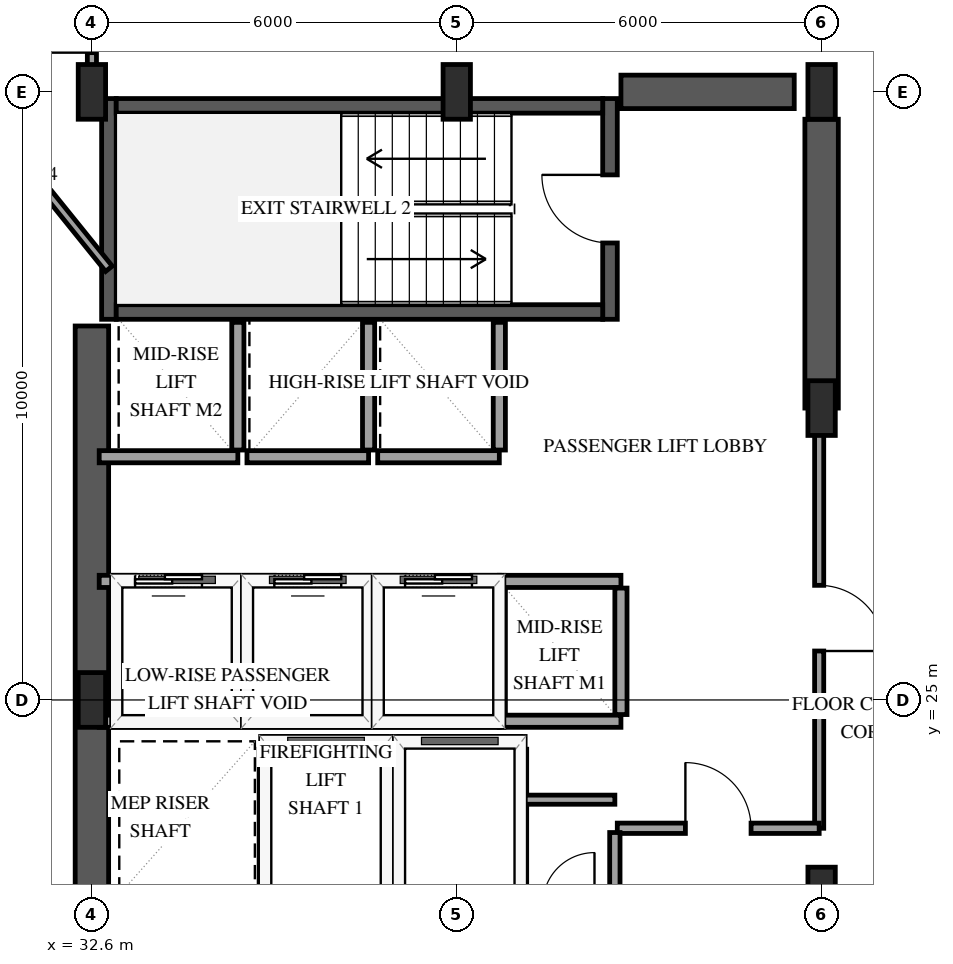
"""IFC4 building model, lengths in metres.
Left out: names, types, materials, properties, quantities, classifications, styles, units other than length and angle.
Written with IfcOpenShell. Run it as: python <this file> out.ifc"""

import sys

from ifc_helpers import new_model, si_unit, direction, frame, frame_2d, origin, origin_2d, place, context, subcontext, project, spatial, rectangle, extrude, element, fill, save


model = new_model("IFC4")
c1 = context("Model", 3, precision=1e-05, world=origin(), true_north=direction((0.0, 1.0)))
c2 = subcontext(c1, "Body", "Model", "MODEL_VIEW")
j1 = project(units=[si_unit("LENGTHUNIT", "METRE"), si_unit("PLANEANGLEUNIT", "RADIAN")], contexts=[c1])
p1 = place(None, origin())
s1 = spatial("IfcSite", under=j1, at=p1, CompositionType="ELEMENT")
p2 = place(p1, origin())
s2 = spatial("IfcBuilding", under=s1, at=p2, CompositionType="ELEMENT")
p3 = place(p2, frame((0.0, 0.0, 122.5)))
s3 = spatial("IfcBuildingStorey", under=s2, at=p3, CompositionType="ELEMENT", Elevation=122.5)
p4 = place(p3, frame((32.88, 31.26, 0.0), z_axis=(0.0, 0.0, 1.0), x_axis=(0.0, 1.0, 0.0)))
e1 = element("IfcWall", 1, at=p4, inside=s3, PredefinedType="SHEAR", context=c2, shape_type="SweptSolid", body=[
    extrude(rectangle(XDim=3.63, YDim=0.24, at=frame_2d((1.815, 0.0))), origin(), (0.0, 0.0, 1.0), 3.9),
])
p5 = place(p3, frame((41.12, 31.26, 0.0), z_axis=(0.0, 0.0, 1.0), x_axis=(0.0, 1.0, 0.0)))
e2 = element("IfcWall", 2, at=p5, inside=s3, PredefinedType="SHEAR", context=c2, shape_type="SweptSolid", body=[
    extrude(rectangle(XDim=3.63, YDim=0.24, at=frame_2d((1.815, 0.0))), origin(), (0.0, 0.0, 1.0), 3.9),
])
p6 = place(p5, frame((1.255, 0.0, 0.0)))
e3 = element("IfcOpeningElement", 3, at=p6, cuts=e2, PredefinedType="OPENING", context=c2, shape_type="SweptSolid", body=[
    extrude(rectangle(XDim=1.12, YDim=2.15, at=frame_2d((0.56, 1.075))), frame((0.0, 0.13, 0.0), z_axis=(0.0, -1.0, 0.0), x_axis=(1.0, 0.0, 0.0)), (0.0, 0.0, 1.0), 0.26),
])
for number, where, z_axis, x_axis in (
    (4, (33.0, 31.38, 0.0), (0.0, 0.0, 1.0), (1.0, 0.0, 0.0)),
    (5, (33.0, 34.77, 0.0), (0.0, 0.0, 1.0), (1.0, 0.0, 0.0)),
):
    element("IfcWall", number, at=place(p3, frame(where, z_axis=z_axis, x_axis=x_axis)), inside=s3, PredefinedType="SHEAR", context=c2, shape_type="SweptSolid", body=[
        extrude(rectangle(XDim=8.0, YDim=0.24, at=frame_2d((4.0, 0.0))), origin(), (0.0, 0.0, 1.0), 3.9),
    ])
p7 = place(p3, frame((32.6, 18.85, 0.0), z_axis=(0.0, 0.0, 1.0), x_axis=(0.0, 1.0, 0.0)))
e6 = element("IfcWall", 6, at=p7, inside=s3, PredefinedType="SHEAR", context=c2, shape_type="SweptSolid", body=[
    extrude(rectangle(XDim=12.3, YDim=0.55, at=frame_2d((6.15, 0.0))), origin(), (0.0, 0.0, 1.0), 3.9),
])
p8 = place(p3, frame((41.3, 35.0, 0.0), z_axis=(0.0, 0.0, 1.0), x_axis=(1.0, 0.0, 0.0)))
e7 = element("IfcWall", 7, at=p8, inside=s3, PredefinedType="SHEAR", context=c2, shape_type="SweptSolid", body=[
    extrude(rectangle(XDim=2.85, YDim=0.55, at=frame_2d((1.425, 0.0))), origin(), (0.0, 0.0, 1.0), 3.9),
])
p9 = place(p3, frame((44.6, 29.8, 0.0), z_axis=(0.0, 0.0, 1.0), x_axis=(0.0, 1.0, 0.0)))
e8 = element("IfcWall", 8, at=p9, inside=s3, PredefinedType="SHEAR", context=c2, shape_type="SweptSolid", body=[
    extrude(rectangle(XDim=4.75, YDim=0.55, at=frame_2d((2.375, 0.0))), origin(), (0.0, 0.0, 1.0), 3.9),
])
for number, where, z_axis, x_axis in (
    (9, (32.6, 25.0, 0.0), (0.0, 0.0, 1.0), (1.0, 0.0, 0.0)),
    (10, (32.6, 35.0, 0.0), (0.0, 0.0, 1.0), (1.0, 0.0, 0.0)),
    (11, (38.6, 35.0, 0.0), (0.0, 0.0, 1.0), (1.0, 0.0, 0.0)),
    (12, (44.6, 21.8, 0.0), (0.0, 0.0, 1.0), (1.0, 0.0, 0.0)),
    (13, (44.6, 29.8, 0.0), (0.0, 0.0, 1.0), (1.0, 0.0, 0.0)),
    (14, (44.6, 35.0, 0.0), (0.0, 0.0, 1.0), (1.0, 0.0, 0.0)),
):
    element("IfcColumn", number, at=place(p3, frame(where, z_axis=z_axis, x_axis=x_axis)), inside=s3, PredefinedType="PILASTER", context=c2, shape_type="SweptSolid", body=[
        extrude(rectangle(XDim=0.45, YDim=0.9, at=origin_2d()), origin(), (0.0, 0.0, 1.0), 3.9),
    ])
p10 = place(p3, frame((35.45, 24.3, 0.0), z_axis=(0.0, 0.0, 1.0), x_axis=(1.0, 0.0, 0.0)))
e15 = element("IfcWall", 15, at=p10, inside=s3, PredefinedType="SOLIDWALL", context=c2, shape_type="SweptSolid", body=[
    extrude(rectangle(XDim=2.0, YDim=0.2, at=frame_2d((1.0, 0.0))), origin(), (0.0, 0.0, 1.0), 3.6),
])
for number, where, z_axis, x_axis in (
    (16, (35.45, 21.81, 0.0), (0.0, 0.0, 1.0), (0.0, 1.0, 0.0)),
    (17, (37.45, 21.81, 0.0), (0.0, 0.0, 1.0), (0.0, 1.0, 0.0)),
):
    element("IfcWall", number, at=place(p3, frame(where, z_axis=z_axis, x_axis=x_axis)), inside=s3, PredefinedType="SOLIDWALL", context=c2, shape_type="SweptSolid", body=[
        extrude(rectangle(XDim=2.38, YDim=0.2, at=frame_2d((1.19, 0.0))), origin(), (0.0, 0.0, 1.0), 3.6),
    ])
p11 = place(p3, frame((37.65, 24.3, 0.0), z_axis=(0.0, 0.0, 1.0), x_axis=(1.0, 0.0, 0.0)))
e18 = element("IfcWall", 18, at=p11, inside=s3, PredefinedType="SOLIDWALL", context=c2, shape_type="SweptSolid", body=[
    extrude(rectangle(XDim=2.0, YDim=0.2, at=frame_2d((1.0, 0.0))), origin(), (0.0, 0.0, 1.0), 3.6),
])
p12 = place(p3, frame((39.65, 21.81, 0.0), z_axis=(0.0, 0.0, 1.0), x_axis=(0.0, 1.0, 0.0)))
e19 = element("IfcWall", 19, at=p12, inside=s3, PredefinedType="SOLIDWALL", context=c2, shape_type="SweptSolid", body=[
    extrude(rectangle(XDim=2.38, YDim=0.2, at=frame_2d((1.19, 0.0))), origin(), (0.0, 0.0, 1.0), 3.6),
])
p13 = place(p3, frame((32.72, 24.65, 0.0), z_axis=(0.0, 0.0, 1.0), x_axis=(1.0, 0.0, 0.0)))
e20 = element("IfcWall", 20, at=p13, inside=s3, PredefinedType="SOLIDWALL", context=c2, shape_type="SweptSolid", body=[
    extrude(rectangle(XDim=2.28, YDim=0.2, at=frame_2d((1.14, 0.0))), origin(), (0.0, 0.0, 1.0), 3.6),
])
p14 = place(p3, frame((32.72, 26.95, 0.0), z_axis=(0.0, 0.0, 1.0), x_axis=(1.0, 0.0, 0.0)))
e21 = element("IfcWall", 21, at=p14, inside=s3, PredefinedType="SOLIDWALL", context=c2, shape_type="SweptSolid", body=[
    extrude(rectangle(XDim=2.28, YDim=0.2, at=frame_2d((1.14, 0.0))), origin(), (0.0, 0.0, 1.0), 3.6),
])
p15 = place(p14, frame((0.59, 0.0, 0.0)))
e22 = element("IfcOpeningElement", 22, at=p15, cuts=e21, PredefinedType="OPENING", context=c2, shape_type="SweptSolid", body=[
    extrude(rectangle(XDim=1.1, YDim=2.15, at=frame_2d((0.55, 1.075))), frame((0.0, 0.11, 0.0), z_axis=(0.0, -1.0, 0.0), x_axis=(1.0, 0.0, 0.0)), (0.0, 0.0, 1.0), 0.22),
])
p16 = place(p3, frame((35.0, 24.76, 0.0), z_axis=(0.0, 0.0, 1.0), x_axis=(0.0, 1.0, 0.0)))
e23 = element("IfcWall", 23, at=p16, inside=s3, PredefinedType="SOLIDWALL", context=c2, shape_type="SweptSolid", body=[
    extrude(rectangle(XDim=2.08, YDim=0.2, at=frame_2d((1.04, 0.0))), origin(), (0.0, 0.0, 1.0), 3.6),
])
p17 = place(p3, frame((35.15, 24.65, 0.0), z_axis=(0.0, 0.0, 1.0), x_axis=(1.0, 0.0, 0.0)))
e24 = element("IfcWall", 24, at=p17, inside=s3, PredefinedType="SOLIDWALL", context=c2, shape_type="SweptSolid", body=[
    extrude(rectangle(XDim=2.0, YDim=0.2, at=frame_2d((1.0, 0.0))), origin(), (0.0, 0.0, 1.0), 3.6),
])
p18 = place(p3, frame((35.15, 26.95, 0.0), z_axis=(0.0, 0.0, 1.0), x_axis=(1.0, 0.0, 0.0)))
e25 = element("IfcWall", 25, at=p18, inside=s3, PredefinedType="SOLIDWALL", context=c2, shape_type="SweptSolid", body=[
    extrude(rectangle(XDim=2.0, YDim=0.2, at=frame_2d((1.0, 0.0))), origin(), (0.0, 0.0, 1.0), 3.6),
])
p19 = place(p18, frame((0.45, 0.0, 0.0)))
e26 = element("IfcOpeningElement", 26, at=p19, cuts=e25, PredefinedType="OPENING", context=c2, shape_type="SweptSolid", body=[
    extrude(rectangle(XDim=1.1, YDim=2.15, at=frame_2d((0.55, 1.075))), frame((0.0, 0.11, 0.0), z_axis=(0.0, -1.0, 0.0), x_axis=(1.0, 0.0, 0.0)), (0.0, 0.0, 1.0), 0.22),
])
p20 = place(p3, frame((37.15, 24.76, 0.0), z_axis=(0.0, 0.0, 1.0), x_axis=(0.0, 1.0, 0.0)))
e27 = element("IfcWall", 27, at=p20, inside=s3, PredefinedType="SOLIDWALL", context=c2, shape_type="SweptSolid", body=[
    extrude(rectangle(XDim=2.08, YDim=0.2, at=frame_2d((1.04, 0.0))), origin(), (0.0, 0.0, 1.0), 3.6),
])
p21 = place(p3, frame((37.3, 24.65, 0.0), z_axis=(0.0, 0.0, 1.0), x_axis=(1.0, 0.0, 0.0)))
e28 = element("IfcWall", 28, at=p21, inside=s3, PredefinedType="SOLIDWALL", context=c2, shape_type="SweptSolid", body=[
    extrude(rectangle(XDim=2.0, YDim=0.2, at=frame_2d((1.0, 0.0))), origin(), (0.0, 0.0, 1.0), 3.6),
])
p22 = place(p3, frame((37.3, 26.95, 0.0), z_axis=(0.0, 0.0, 1.0), x_axis=(1.0, 0.0, 0.0)))
e29 = element("IfcWall", 29, at=p22, inside=s3, PredefinedType="SOLIDWALL", context=c2, shape_type="SweptSolid", body=[
    extrude(rectangle(XDim=2.0, YDim=0.2, at=frame_2d((1.0, 0.0))), origin(), (0.0, 0.0, 1.0), 3.6),
])
p23 = place(p22, frame((0.45, 0.0, 0.0)))
e30 = element("IfcOpeningElement", 30, at=p23, cuts=e29, PredefinedType="OPENING", context=c2, shape_type="SweptSolid", body=[
    extrude(rectangle(XDim=1.1, YDim=2.15, at=frame_2d((0.55, 1.075))), frame((0.0, 0.11, 0.0), z_axis=(0.0, -1.0, 0.0), x_axis=(1.0, 0.0, 0.0)), (0.0, 0.0, 1.0), 0.22),
])
p24 = place(p3, frame((39.3, 24.76, 0.0), z_axis=(0.0, 0.0, 1.0), x_axis=(0.0, 1.0, 0.0)))
e31 = element("IfcWall", 31, at=p24, inside=s3, PredefinedType="SOLIDWALL", context=c2, shape_type="SweptSolid", body=[
    extrude(rectangle(XDim=2.08, YDim=0.2, at=frame_2d((1.04, 0.0))), origin(), (0.0, 0.0, 1.0), 3.6),
])
for number, where, z_axis, x_axis in (
    (32, (39.3, 24.65, 0.0), (0.0, 0.0, 1.0), (1.0, 0.0, 0.0)),
    (33, (39.3, 26.95, 0.0), (0.0, 0.0, 1.0), (1.0, 0.0, 0.0)),
):
    element("IfcWall", number, at=place(p3, frame(where, z_axis=z_axis, x_axis=x_axis)), inside=s3, PredefinedType="SOLIDWALL", context=c2, shape_type="SweptSolid", body=[
        extrude(rectangle(XDim=2.0, YDim=0.2, at=frame_2d((1.0, 0.0))), origin(), (0.0, 0.0, 1.0), 3.6),
    ])
p25 = place(p3, frame((41.3, 24.76, 0.0), z_axis=(0.0, 0.0, 1.0), x_axis=(0.0, 1.0, 0.0)))
e34 = element("IfcWall", 34, at=p25, inside=s3, PredefinedType="SOLIDWALL", context=c2, shape_type="SweptSolid", body=[
    extrude(rectangle(XDim=2.08, YDim=0.2, at=frame_2d((1.04, 0.0))), origin(), (0.0, 0.0, 1.0), 3.6),
])
p26 = place(p3, frame((32.72, 29.0, 0.0), z_axis=(0.0, 0.0, 1.0), x_axis=(1.0, 0.0, 0.0)))
e35 = element("IfcWall", 35, at=p26, inside=s3, PredefinedType="SOLIDWALL", context=c2, shape_type="SweptSolid", body=[
    extrude(rectangle(XDim=2.28, YDim=0.2, at=frame_2d((1.14, 0.0))), origin(), (0.0, 0.0, 1.0), 3.6),
])
p27 = place(p3, frame((35.0, 29.11, 0.0), z_axis=(0.0, 0.0, 1.0), x_axis=(0.0, 1.0, 0.0)))
e36 = element("IfcWall", 36, at=p27, inside=s3, PredefinedType="SOLIDWALL", context=c2, shape_type="SweptSolid", body=[
    extrude(rectangle(XDim=2.1, YDim=0.2, at=frame_2d((1.05, 0.0))), origin(), (0.0, 0.0, 1.0), 3.6),
])
p28 = place(p3, frame((35.15, 29.0, 0.0), z_axis=(0.0, 0.0, 1.0), x_axis=(1.0, 0.0, 0.0)))
e37 = element("IfcWall", 37, at=p28, inside=s3, PredefinedType="SOLIDWALL", context=c2, shape_type="SweptSolid", body=[
    extrude(rectangle(XDim=2.0, YDim=0.2, at=frame_2d((1.0, 0.0))), origin(), (0.0, 0.0, 1.0), 3.6),
])
p29 = place(p3, frame((37.15, 29.11, 0.0), z_axis=(0.0, 0.0, 1.0), x_axis=(0.0, 1.0, 0.0)))
e38 = element("IfcWall", 38, at=p29, inside=s3, PredefinedType="SOLIDWALL", context=c2, shape_type="SweptSolid", body=[
    extrude(rectangle(XDim=2.1, YDim=0.2, at=frame_2d((1.05, 0.0))), origin(), (0.0, 0.0, 1.0), 3.6),
])
p30 = place(p3, frame((37.3, 29.0, 0.0), z_axis=(0.0, 0.0, 1.0), x_axis=(1.0, 0.0, 0.0)))
e39 = element("IfcWall", 39, at=p30, inside=s3, PredefinedType="SOLIDWALL", context=c2, shape_type="SweptSolid", body=[
    extrude(rectangle(XDim=2.0, YDim=0.2, at=frame_2d((1.0, 0.0))), origin(), (0.0, 0.0, 1.0), 3.6),
])
p31 = place(p3, frame((39.3, 29.11, 0.0), z_axis=(0.0, 0.0, 1.0), x_axis=(0.0, 1.0, 0.0)))
e40 = element("IfcWall", 40, at=p31, inside=s3, PredefinedType="SOLIDWALL", context=c2, shape_type="SweptSolid", body=[
    extrude(rectangle(XDim=2.1, YDim=0.2, at=frame_2d((1.05, 0.0))), origin(), (0.0, 0.0, 1.0), 3.6),
])
p32 = place(p3, frame((44.56, 29.8, 0.0), z_axis=(0.0, 0.0, 1.0), x_axis=(0.0, -1.0, 0.0)))
e41 = element("IfcWall", 41, at=p32, inside=s3, PredefinedType="PARTITIONING", context=c2, shape_type="SweptSolid", body=[
    extrude(rectangle(XDim=6.91, YDim=0.15, at=frame_2d((3.455, 0.0))), origin(), (0.0, 0.0, 1.0), 2.64),
])
p33 = place(p32, frame((2.915, 0.0, 0.0)))
e42 = element("IfcOpeningElement", 42, at=p33, cuts=e41, PredefinedType="OPENING", context=c2, shape_type="SweptSolid", body=[
    extrude(rectangle(XDim=1.08, YDim=2.15, at=frame_2d((0.54, 1.075))), frame((0.0, 0.085, 0.0), z_axis=(0.0, -1.0, 0.0), x_axis=(1.0, 0.0, 0.0)), (0.0, 0.0, 1.0), 0.17),
])
p34 = place(p3, frame((32.88, 32.091, 0.0), z_axis=(0.0, 0.0, 1.0), x_axis=(-0.627800500923, 0.778374287243, 0.0)))
e43 = element("IfcWall", 43, at=p34, inside=s3, PredefinedType="PARTITIONING", context=c2, shape_type="SweptSolid", body=[
    extrude(rectangle(XDim=3.972, YDim=0.14, at=frame_2d((1.986, 0.0))), origin(), (0.0, 0.0, 1.0), 3.6),
])
p35 = place(p3, frame((41.24, 22.89, 0.0), z_axis=(0.0, 0.0, 1.0), x_axis=(1.0, 0.0, 0.0)))
e44 = element("IfcWall", 44, at=p35, inside=s3, PredefinedType="PARTITIONING", context=c2, shape_type="SweptSolid", body=[
    extrude(rectangle(XDim=3.32, YDim=0.17, at=frame_2d((1.66, 0.0))), origin(), (0.0, 0.0, 1.0), 3.6),
])
p36 = place(p35, frame((1.12, 0.0, 0.0)))
e45 = element("IfcOpeningElement", 45, at=p36, cuts=e44, PredefinedType="OPENING", context=c2, shape_type="SweptSolid", body=[
    extrude(rectangle(XDim=1.08, YDim=2.15, at=frame_2d((0.54, 1.075))), frame((0.0, 0.095, 0.0), z_axis=(0.0, -1.0, 0.0), x_axis=(1.0, 0.0, 0.0)), (0.0, 0.0, 1.0), 0.19),
])
p37 = place(p3, frame((32.6, 35.07, 0.0), z_axis=(0.0, 0.0, 1.0), x_axis=(0.0, 1.0, 0.0)))
e46 = element("IfcWall", 46, at=p37, inside=s3, PredefinedType="PARTITIONING", context=c2, shape_type="SweptSolid", body=[
    extrude(rectangle(XDim=1.91, YDim=0.15, at=frame_2d((0.955, 0.0))), origin(), (0.0, 0.0, 1.0), 3.6),
])
p38 = place(p37, frame((0.575, 0.0, 0.0)))
e47 = element("IfcOpeningElement", 47, at=p38, cuts=e46, PredefinedType="OPENING", context=c2, shape_type="SweptSolid", body=[
    extrude(rectangle(XDim=0.92, YDim=2.12, at=frame_2d((0.46, 1.06))), frame((0.0, 0.085, 0.0), z_axis=(0.0, -1.0, 0.0), x_axis=(1.0, 0.0, 0.0)), (0.0, 0.0, 1.0), 0.17),
])
p39 = place(p3, frame((41.2, 21.7, 0.0), z_axis=(0.0, 0.0, 1.0), x_axis=(0.0, 1.0, 0.0)))
e48 = element("IfcWall", 48, at=p39, inside=s3, PredefinedType="PARTITIONING", context=c2, shape_type="SweptSolid", body=[
    extrude(rectangle(XDim=1.12, YDim=0.17, at=frame_2d((0.56, 0.0))), origin(), (0.0, 0.0, 1.0), 3.6),
])
p40 = place(p3, frame((41.2, 23.36, 0.0), z_axis=(0.0, 0.0, 1.0), x_axis=(-1.0, 0.0, 0.0)))
e49 = element("IfcWall", 49, at=p40, inside=s3, PredefinedType="PARTITIONING", context=c2, shape_type="SweptSolid", body=[
    extrude(rectangle(XDim=1.48, YDim=0.15, at=frame_2d((0.74, 0.0))), origin(), (0.0, 0.0, 1.0), 3.6),
])
p41 = place(p15, origin())
e50 = element("IfcDoor", 50, at=p41, inside=s3, OperationType="SLIDING_TO_LEFT", PredefinedType="DOOR", context=c2, shape_type="SweptSolid", body=[
    extrude(rectangle(XDim=1.1, YDim=2.15, at=frame_2d((0.55, 1.075))), frame((0.0, 0.025, 0.0), z_axis=(0.0, -1.0, 0.0), x_axis=(1.0, 0.0, 0.0)), (0.0, 0.0, 1.0), 0.05),
])
fill(e22, e50)
p42 = place(p19, origin())
e51 = element("IfcDoor", 51, at=p42, inside=s3, OperationType="SLIDING_TO_LEFT", PredefinedType="DOOR", context=c2, shape_type="SweptSolid", body=[
    extrude(rectangle(XDim=1.1, YDim=2.15, at=frame_2d((0.55, 1.075))), frame((0.0, 0.025, 0.0), z_axis=(0.0, -1.0, 0.0), x_axis=(1.0, 0.0, 0.0)), (0.0, 0.0, 1.0), 0.05),
])
fill(e26, e51)
p43 = place(p23, origin())
e52 = element("IfcDoor", 52, at=p43, inside=s3, OperationType="SLIDING_TO_LEFT", PredefinedType="DOOR", context=c2, shape_type="SweptSolid", body=[
    extrude(rectangle(XDim=1.1, YDim=2.15, at=frame_2d((0.55, 1.075))), frame((0.0, 0.025, 0.0), z_axis=(0.0, -1.0, 0.0), x_axis=(1.0, 0.0, 0.0)), (0.0, 0.0, 1.0), 0.05),
])
fill(e30, e52)
p44 = place(p6, origin())
e53 = element("IfcDoor", 53, at=p44, inside=s3, OperationType="SINGLE_SWING_RIGHT", PredefinedType="DOOR", context=c2, shape_type="SweptSolid", body=[
    extrude(rectangle(XDim=1.12, YDim=2.15, at=frame_2d((0.56, 1.075))), frame((0.0, 0.025, 0.0), z_axis=(0.0, -1.0, 0.0), x_axis=(1.0, 0.0, 0.0)), (0.0, 0.0, 1.0), 0.05),
])
fill(e3, e53)
p45 = place(p33, origin())
e54 = element("IfcDoor", 54, at=p45, inside=s3, OperationType="SINGLE_SWING_RIGHT", PredefinedType="DOOR", context=c2, shape_type="SweptSolid", body=[
    extrude(rectangle(XDim=1.08, YDim=2.15, at=frame_2d((0.54, 1.075))), frame((0.0, 0.025, 0.0), z_axis=(0.0, -1.0, 0.0), x_axis=(1.0, 0.0, 0.0)), (0.0, 0.0, 1.0), 0.05),
])
fill(e42, e54)
p46 = place(p36, origin())
e55 = element("IfcDoor", 55, at=p46, inside=s3, OperationType="SINGLE_SWING_LEFT", PredefinedType="DOOR", context=c2, shape_type="SweptSolid", body=[
    extrude(rectangle(XDim=1.08, YDim=2.15, at=frame_2d((0.54, 1.075))), frame((0.0, 0.025, 0.0), z_axis=(0.0, -1.0, 0.0), x_axis=(1.0, 0.0, 0.0)), (0.0, 0.0, 1.0), 0.05),
])
fill(e45, e55)
p47 = place(p38, origin())
e56 = element("IfcDoor", 56, at=p47, inside=s3, OperationType="SINGLE_SWING_LEFT", PredefinedType="DOOR", context=c2, shape_type="SweptSolid", body=[
    extrude(rectangle(XDim=0.92, YDim=2.12, at=frame_2d((0.46, 1.06))), frame((0.0, 0.025, 0.0), z_axis=(0.0, -1.0, 0.0), x_axis=(1.0, 0.0, 0.0)), (0.0, 0.0, 1.0), 0.05),
])
fill(e47, e56)
save(model, sys.argv[1])
